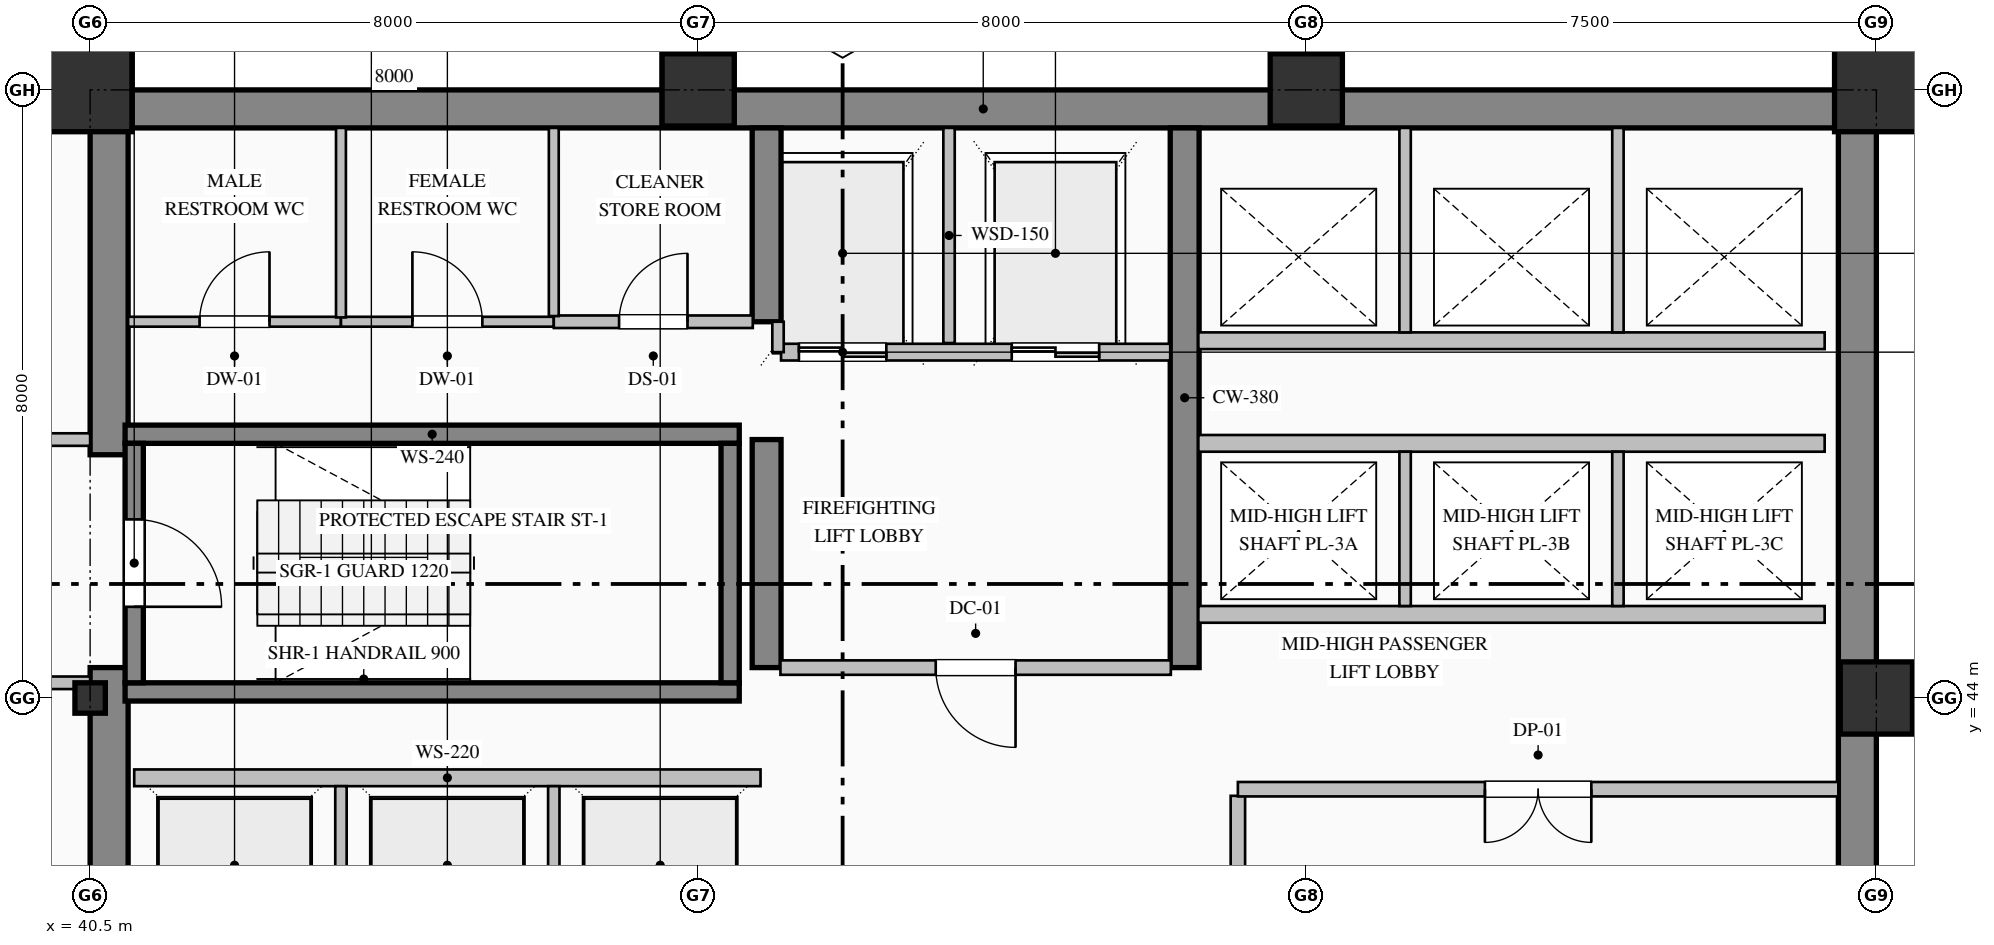
"""IFC4 building model, lengths in metres.
Left out: names, types, materials, properties, quantities, classifications, styles, units other than length and angle.
Written with IfcOpenShell. Run it as: python <this file> out.ifc"""

import sys

from ifc_helpers import new_model, si_unit, direction, frame, frame_2d, origin, origin_2d, place, context, subcontext, project, spatial, rectangle, hollow_rectangle, i_section, extrude, element, fill, save


model = new_model("IFC4")
c1 = context("Model", 3, precision=1e-05, world=origin(), true_north=direction((0.0, 1.0)))
c2 = subcontext(c1, "Body", "Model", "MODEL_VIEW")
j1 = project(units=[si_unit("LENGTHUNIT", "METRE"), si_unit("PLANEANGLEUNIT", "RADIAN")], contexts=[c1])
p1 = place(None, origin())
s1 = spatial("IfcSite", under=j1, at=p1, CompositionType="ELEMENT")
p2 = place(p1, origin())
s2 = spatial("IfcBuilding", under=s1, at=p2, CompositionType="ELEMENT")
p3 = place(p2, frame((0.0, 0.0, 139.0)))
s3 = spatial("IfcBuildingStorey", under=s2, at=p3, CompositionType="ELEMENT", Elevation=139.0)
p4 = place(p3, frame((40.5, 51.75, 0.0), z_axis=(0.0, 0.0, 1.0), x_axis=(1.0, 0.0, 0.0)))
e1 = element("IfcWall", 1, at=p4, inside=s3, PredefinedType="SHEAR", context=c2, shape_type="SweptSolid", body=[
    extrude(rectangle(XDim=23.5, YDim=0.5, at=frame_2d((11.75, 0.0))), origin(), (0.0, 0.0, 1.0), 3.765),
])
p5 = place(p3, frame((63.75, 36.32, 0.0), z_axis=(0.0, 0.0, 1.0), x_axis=(0.0, 1.0, 0.0)))
e2 = element("IfcWall", 2, at=p5, inside=s3, PredefinedType="SHEAR", context=c2, shape_type="SweptSolid", body=[
    extrude(rectangle(XDim=15.18, YDim=0.5, at=frame_2d((7.59, 0.0))), origin(), (0.0, 0.0, 1.0), 3.765),
])
p6 = place(p3, frame((40.75, 36.5, 0.0), z_axis=(0.0, 0.0, 1.0), x_axis=(0.0, 1.0, 0.0)))
e3 = element("IfcWall", 3, at=p6, inside=s3, PredefinedType="SHEAR", context=c2, shape_type="SweptSolid", body=[
    extrude(rectangle(XDim=7.9, YDim=0.5, at=frame_2d((3.95, 0.0))), origin(), (0.0, 0.0, 1.0), 3.765),
])
p7 = place(p3, frame((40.75, 47.2, 0.0), z_axis=(0.0, 0.0, 1.0), x_axis=(0.0, 1.0, 0.0)))
e4 = element("IfcWall", 4, at=p7, inside=s3, PredefinedType="SHEAR", context=c2, shape_type="SweptSolid", body=[
    extrude(rectangle(XDim=4.3, YDim=0.5, at=frame_2d((2.15, 0.0))), origin(), (0.0, 0.0, 1.0), 3.765),
])
p8 = place(p3, frame((49.4, 44.4, 0.0), z_axis=(0.0, 0.0, 1.0), x_axis=(0.0, 1.0, 0.0)))
e5 = element("IfcWall", 5, at=p8, inside=s3, PredefinedType="SHEAR", context=c2, shape_type="SweptSolid", body=[
    extrude(rectangle(XDim=3.0, YDim=0.38, at=frame_2d((1.5, 0.0))), origin(), (0.0, 0.0, 1.0), 3.765),
])
p9 = place(p3, frame((49.4, 48.95, 0.0), z_axis=(0.0, 0.0, 1.0), x_axis=(0.0, 1.0, 0.0)))
e6 = element("IfcWall", 6, at=p9, inside=s3, PredefinedType="SHEAR", context=c2, shape_type="SweptSolid", body=[
    extrude(rectangle(XDim=2.55, YDim=0.38, at=frame_2d((1.275, 0.0))), origin(), (0.0, 0.0, 1.0), 3.765),
])
p10 = place(p3, frame((54.9, 44.4, 0.0), z_axis=(0.0, 0.0, 1.0), x_axis=(0.0, 1.0, 0.0)))
e7 = element("IfcWall", 7, at=p10, inside=s3, PredefinedType="SHEAR", context=c2, shape_type="SweptSolid", body=[
    extrude(rectangle(XDim=7.1, YDim=0.38, at=frame_2d((3.55, 0.0))), origin(), (0.0, 0.0, 1.0), 3.765),
])
p11 = place(p3, frame((40.5, 44.0, 0.0), z_axis=(0.0, 0.0, 1.0), x_axis=(1.0, 0.0, 0.0)))
e8 = element("IfcColumn", 8, at=p11, inside=s3, PredefinedType="COLUMN", context=c2, shape_type="SweptSolid", body=[
    extrude(i_section(OverallWidth=0.4, OverallDepth=0.4, WebThickness=0.013, FlangeThickness=0.021, FilletRadius=0.022, at=origin_2d()), origin(), (0.0, 0.0, 1.0), 4.0),
])
p12 = place(p3, frame((40.5, 52.0, 0.0), z_axis=(0.0, 0.0, 1.0), x_axis=(1.0, 0.0, 0.0)))
e9 = element("IfcColumn", 9, at=p12, inside=s3, PredefinedType="COLUMN", context=c2, shape_type="SweptSolid", body=[
    extrude(hollow_rectangle(XDim=1.1, YDim=1.1, WallThickness=0.04, at=origin_2d()), origin(), (0.0, 0.0, 1.0), 4.0),
])
for number, where, z_axis, x_axis in (
    (10, (48.5, 52.0, 0.0), (0.0, 0.0, 1.0), (1.0, 0.0, 0.0)),
    (11, (56.5, 52.0, 0.0), (0.0, 0.0, 1.0), (1.0, 0.0, 0.0)),
    (12, (64.0, 44.0, 0.0), (0.0, 0.0, 1.0), (1.0, 0.0, 0.0)),
):
    element("IfcColumn", number, at=place(p3, frame(where, z_axis=z_axis, x_axis=x_axis)), inside=s3, PredefinedType="COLUMN", context=c2, shape_type="SweptSolid", body=[
        extrude(hollow_rectangle(XDim=0.95, YDim=0.95, WallThickness=0.036, at=origin_2d()), origin(), (0.0, 0.0, 1.0), 4.0),
    ])
p13 = place(p3, frame((64.0, 52.0, 0.0), z_axis=(0.0, 0.0, 1.0), x_axis=(1.0, 0.0, 0.0)))
e13 = element("IfcColumn", 13, at=p13, inside=s3, PredefinedType="COLUMN", context=c2, shape_type="SweptSolid", body=[
    extrude(hollow_rectangle(XDim=1.1, YDim=1.1, WallThickness=0.04, at=origin_2d()), origin(), (0.0, 0.0, 1.0), 4.0),
])
p14 = place(p3, frame((13.0, 51.83, 0.0), z_axis=(0.0, 0.0, 1.0), x_axis=(1.0, 0.0, 0.0)))
e14 = element("IfcWall", 14, at=p14, inside=s3, PredefinedType="SOLIDWALL", context=c2, shape_type="SweptSolid", body=[
    extrude(rectangle(XDim=27.52, YDim=0.34, at=frame_2d((13.76, 0.0))), origin(), (0.0, 0.0, 1.0), 3.265),
])
p15 = place(p14, frame((6.45, 0.0, 0.85)))
e15 = element("IfcOpeningElement", 15, at=p15, cuts=e14, PredefinedType="OPENING", context=c2, shape_type="SweptSolid", body=[
    extrude(rectangle(XDim=1.5, YDim=1.95, at=frame_2d((0.75, 0.975))), frame((0.0, 0.18, 0.0), z_axis=(0.0, -1.0, 0.0), x_axis=(1.0, 0.0, 0.0)), (0.0, 0.0, 1.0), 0.36),
])
p16 = place(p14, frame((13.8, 0.0, 0.7)))
e16 = element("IfcOpeningElement", 16, at=p16, cuts=e14, PredefinedType="OPENING", context=c2, shape_type="SweptSolid", body=[
    extrude(rectangle(XDim=1.2, YDim=1.85, at=frame_2d((0.6, 0.925))), frame((0.0, 0.18, 0.0), z_axis=(0.0, -1.0, 0.0), x_axis=(1.0, 0.0, 0.0)), (0.0, 0.0, 1.0), 0.36),
])
for number, where, z_axis, x_axis in (
    (17, (40.96, 47.47, 0.0), (0.0, 0.0, 1.0), (1.0, 0.0, 0.0)),
    (18, (49.04, 44.08, 0.0), (0.0, 0.0, 1.0), (-1.0, 0.0, 0.0)),
):
    element("IfcWall", number, at=place(p3, frame(where, z_axis=z_axis, x_axis=x_axis)), inside=s3, PredefinedType="SOLIDWALL", context=c2, shape_type="SweptSolid", body=[
        extrude(rectangle(XDim=8.08, YDim=0.24, at=frame_2d((4.04, 0.0))), origin(), (0.0, 0.0, 1.0), 4.0),
    ])
p17 = place(p3, frame((41.08, 47.35, 0.0), z_axis=(0.0, 0.0, 1.0), x_axis=(0.0, -1.0, 0.0)))
e19 = element("IfcWall", 19, at=p17, inside=s3, PredefinedType="SOLIDWALL", context=c2, shape_type="SweptSolid", body=[
    extrude(rectangle(XDim=3.15, YDim=0.24, at=frame_2d((1.575, 0.0))), origin(), (0.0, 0.0, 1.0), 4.0),
])
p18 = place(p17, frame((1.0, 0.0, 0.0)))
e20 = element("IfcOpeningElement", 20, at=p18, cuts=e19, PredefinedType="OPENING", context=c2, shape_type="SweptSolid", body=[
    extrude(rectangle(XDim=1.15, YDim=2.2, at=frame_2d((0.575, 1.1))), frame((0.0, 0.13, 0.0), z_axis=(0.0, -1.0, 0.0), x_axis=(1.0, 0.0, 0.0)), (0.0, 0.0, 1.0), 0.26),
])
p19 = place(p3, frame((48.92, 44.2, 0.0), z_axis=(0.0, 0.0, 1.0), x_axis=(0.0, 1.0, 0.0)))
e21 = element("IfcWall", 21, at=p19, inside=s3, PredefinedType="SOLIDWALL", context=c2, shape_type="SweptSolid", body=[
    extrude(rectangle(XDim=3.15, YDim=0.24, at=frame_2d((1.575, 0.0))), origin(), (0.0, 0.0, 1.0), 4.0),
])
p20 = place(p3, frame((54.71, 48.55, 0.0), z_axis=(0.0, 0.0, 1.0), x_axis=(-1.0, 0.0, 0.0)))
e22 = element("IfcWall", 22, at=p20, inside=s3, PredefinedType="PARTITIONING", context=c2, shape_type="SweptSolid", body=[
    extrude(rectangle(XDim=5.12, YDim=0.22, at=frame_2d((2.56, 0.0))), origin(), (0.0, 0.0, 1.0), 3.765),
])
p21 = place(p20, frame((3.735, 0.0, 0.0)))
e23 = element("IfcOpeningElement", 23, at=p21, cuts=e22, PredefinedType="OPENING", context=c2, shape_type="SweptSolid", body=[
    extrude(rectangle(XDim=1.15, YDim=2.2, at=frame_2d((0.575, 1.1))), frame((0.0, 0.12, 0.0), z_axis=(0.0, -1.0, 0.0), x_axis=(1.0, 0.0, 0.0)), (0.0, 0.0, 1.0), 0.24),
])
p22 = place(p20, frame((0.935, 0.0, 0.0)))
e24 = element("IfcOpeningElement", 24, at=p22, cuts=e22, PredefinedType="OPENING", context=c2, shape_type="SweptSolid", body=[
    extrude(rectangle(XDim=1.15, YDim=2.2, at=frame_2d((0.575, 1.1))), frame((0.0, 0.12, 0.0), z_axis=(0.0, -1.0, 0.0), x_axis=(1.0, 0.0, 0.0)), (0.0, 0.0, 1.0), 0.24),
])
p23 = place(p3, frame((51.8, 48.67, 0.0), z_axis=(0.0, 0.0, 1.0), x_axis=(0.0, 1.0, 0.0)))
e25 = element("IfcWall", 25, at=p23, inside=s3, PredefinedType="PARTITIONING", context=c2, shape_type="SweptSolid", body=[
    extrude(rectangle(XDim=2.83, YDim=0.15, at=frame_2d((1.415, 0.0))), origin(), (0.0, 0.0, 1.0), 3.765),
])
p24 = place(p3, frame((49.55, 48.55, 0.0), z_axis=(0.0, 0.0, 1.0), x_axis=(0.0, 1.0, 0.0)))
e26 = element("IfcWall", 26, at=p24, inside=s3, PredefinedType="PARTITIONING", context=c2, shape_type="SweptSolid", body=[
    extrude(rectangle(XDim=0.4, YDim=0.15, at=frame_2d((0.2, 0.0))), origin(), (0.0, 0.0, 1.0), 3.765),
])
p25 = place(p3, frame((41.08, 42.95, 0.0), z_axis=(0.0, 0.0, 1.0), x_axis=(1.0, 0.0, 0.0)))
e27 = element("IfcWall", 27, at=p25, inside=s3, PredefinedType="PARTITIONING", context=c2, shape_type="SweptSolid", body=[
    extrude(rectangle(XDim=8.24, YDim=0.22, at=frame_2d((4.12, 0.0))), origin(), (0.0, 0.0, 1.0), 3.765),
])
for number, where, z_axis, x_axis in (
    (28, (43.8, 40.76, 0.0), (0.0, 0.0, 1.0), (0.0, 1.0, 0.0)),
    (29, (46.6, 40.76, 0.0), (0.0, 0.0, 1.0), (0.0, 1.0, 0.0)),
):
    element("IfcWall", number, at=place(p3, frame(where, z_axis=z_axis, x_axis=x_axis)), inside=s3, PredefinedType="PARTITIONING", context=c2, shape_type="SweptSolid", body=[
        extrude(rectangle(XDim=2.08, YDim=0.15, at=frame_2d((1.04, 0.0))), origin(), (0.0, 0.0, 1.0), 3.765),
    ])
for number, where, z_axis, x_axis in (
    (30, (63.32, 45.1, 0.0), (0.0, 0.0, 1.0), (-1.0, 0.0, 0.0)),
    (31, (55.08, 47.35, 0.0), (0.0, 0.0, 1.0), (1.0, 0.0, 0.0)),
):
    element("IfcWall", number, at=place(p3, frame(where, z_axis=z_axis, x_axis=x_axis)), inside=s3, PredefinedType="PARTITIONING", context=c2, shape_type="SweptSolid", body=[
        extrude(rectangle(XDim=8.24, YDim=0.22, at=frame_2d((4.12, 0.0))), origin(), (0.0, 0.0, 1.0), 3.765),
    ])
for number, where, z_axis, x_axis in (
    (32, (57.8, 45.21, 0.0), (0.0, 0.0, 1.0), (0.0, 1.0, 0.0)),
    (33, (60.6, 45.21, 0.0), (0.0, 0.0, 1.0), (0.0, 1.0, 0.0)),
):
    element("IfcWall", number, at=place(p3, frame(where, z_axis=z_axis, x_axis=x_axis)), inside=s3, PredefinedType="PARTITIONING", context=c2, shape_type="SweptSolid", body=[
        extrude(rectangle(XDim=2.03, YDim=0.15, at=frame_2d((1.015, 0.0))), origin(), (0.0, 0.0, 1.0), 3.765),
    ])
p26 = place(p3, frame((63.32, 48.7, 0.0), z_axis=(0.0, 0.0, 1.0), x_axis=(-1.0, 0.0, 0.0)))
e34 = element("IfcWall", 34, at=p26, inside=s3, PredefinedType="PARTITIONING", context=c2, shape_type="SweptSolid", body=[
    extrude(rectangle(XDim=8.24, YDim=0.22, at=frame_2d((4.12, 0.0))), origin(), (0.0, 0.0, 1.0), 3.765),
])
for number, where, z_axis, x_axis in (
    (35, (57.8, 48.81, 0.0), (0.0, 0.0, 1.0), (0.0, 1.0, 0.0)),
    (36, (60.6, 48.81, 0.0), (0.0, 0.0, 1.0), (0.0, 1.0, 0.0)),
):
    element("IfcWall", number, at=place(p3, frame(where, z_axis=z_axis, x_axis=x_axis)), inside=s3, PredefinedType="PARTITIONING", context=c2, shape_type="SweptSolid", body=[
        extrude(rectangle(XDim=2.69, YDim=0.15, at=frame_2d((1.345, 0.0))), origin(), (0.0, 0.0, 1.0), 3.765),
    ])
p27 = place(p3, frame((37.8, 47.4, 0.0), z_axis=(0.0, 0.0, 1.0), x_axis=(1.0, 0.0, 0.0)))
e37 = element("IfcWall", 37, at=p27, inside=s3, PredefinedType="PARTITIONING", context=c2, shape_type="SweptSolid", body=[
    extrude(rectangle(XDim=2.7, YDim=0.165, at=frame_2d((1.35, 0.0))), origin(), (0.0, 0.0, 1.0), 3.765),
])
p28 = place(p27, frame((0.825, 0.0, 0.0)))
e38 = element("IfcOpeningElement", 38, at=p28, cuts=e37, PredefinedType="OPENING", context=c2, shape_type="SweptSolid", body=[
    extrude(rectangle(XDim=1.05, YDim=2.15, at=frame_2d((0.525, 1.075))), frame((0.0, 0.093, 0.0), z_axis=(0.0, -1.0, 0.0), x_axis=(1.0, 0.0, 0.0)), (0.0, 0.0, 1.0), 0.185),
])
p29 = place(p3, frame((40.5, 44.2, 0.0), z_axis=(0.0, 0.0, 1.0), x_axis=(-1.0, 0.0, 0.0)))
e39 = element("IfcWall", 39, at=p29, inside=s3, PredefinedType="PARTITIONING", context=c2, shape_type="SweptSolid", body=[
    extrude(rectangle(XDim=2.7, YDim=0.165, at=frame_2d((1.35, 0.0))), origin(), (0.0, 0.0, 1.0), 3.765),
])
p30 = place(p29, frame((0.825, 0.0, 0.0)))
e40 = element("IfcOpeningElement", 40, at=p30, cuts=e39, PredefinedType="OPENING", context=c2, shape_type="SweptSolid", body=[
    extrude(rectangle(XDim=1.05, YDim=2.15, at=frame_2d((0.525, 1.075))), frame((0.0, 0.093, 0.0), z_axis=(0.0, -1.0, 0.0), x_axis=(1.0, 0.0, 0.0)), (0.0, 0.0, 1.0), 0.185),
])
p31 = place(p3, frame((41.0, 48.95, 0.0), z_axis=(0.0, 0.0, 1.0), x_axis=(1.0, 0.0, 0.0)))
e41 = element("IfcWall", 41, at=p31, inside=s3, PredefinedType="PARTITIONING", context=c2, shape_type="SweptSolid", body=[
    extrude(rectangle(XDim=2.8, YDim=0.13, at=frame_2d((1.4, 0.0))), origin(), (0.0, 0.0, 1.0), 3.765),
])
p32 = place(p31, frame((0.94, 0.0, 0.0)))
e42 = element("IfcOpeningElement", 42, at=p32, cuts=e41, PredefinedType="OPENING", context=c2, shape_type="SweptSolid", body=[
    extrude(rectangle(XDim=0.92, YDim=2.15, at=frame_2d((0.46, 1.075))), frame((0.0, 0.075, 0.0), z_axis=(0.0, -1.0, 0.0), x_axis=(1.0, 0.0, 0.0)), (0.0, 0.0, 1.0), 0.15),
])
p33 = place(p3, frame((43.8, 48.95, 0.0), z_axis=(0.0, 0.0, 1.0), x_axis=(1.0, 0.0, 0.0)))
e43 = element("IfcWall", 43, at=p33, inside=s3, PredefinedType="PARTITIONING", context=c2, shape_type="SweptSolid", body=[
    extrude(rectangle(XDim=2.8, YDim=0.13, at=frame_2d((1.4, 0.0))), origin(), (0.0, 0.0, 1.0), 3.765),
])
p34 = place(p33, frame((0.94, 0.0, 0.0)))
e44 = element("IfcOpeningElement", 44, at=p34, cuts=e43, PredefinedType="OPENING", context=c2, shape_type="SweptSolid", body=[
    extrude(rectangle(XDim=0.92, YDim=2.15, at=frame_2d((0.46, 1.075))), frame((0.0, 0.075, 0.0), z_axis=(0.0, -1.0, 0.0), x_axis=(1.0, 0.0, 0.0)), (0.0, 0.0, 1.0), 0.15),
])
p35 = place(p3, frame((46.6, 48.95, 0.0), z_axis=(0.0, 0.0, 1.0), x_axis=(1.0, 0.0, 0.0)))
e45 = element("IfcWall", 45, at=p35, inside=s3, PredefinedType="PARTITIONING", context=c2, shape_type="SweptSolid", body=[
    extrude(rectangle(XDim=2.618, YDim=0.165, at=frame_2d((1.309, 0.0))), origin(), (0.0, 0.0, 1.0), 3.765),
])
p36 = place(p35, frame((0.859, 0.0, 0.0)))
e46 = element("IfcOpeningElement", 46, at=p36, cuts=e45, PredefinedType="OPENING", context=c2, shape_type="SweptSolid", body=[
    extrude(rectangle(XDim=0.9, YDim=2.15, at=frame_2d((0.45, 1.075))), frame((0.0, 0.093, 0.0), z_axis=(0.0, -1.0, 0.0), x_axis=(1.0, 0.0, 0.0)), (0.0, 0.0, 1.0), 0.185),
])
p37 = place(p3, frame((54.718, 44.4, 0.0), z_axis=(0.0, 0.0, 1.0), x_axis=(-1.0, 0.0, 0.0)))
e47 = element("IfcWall", 47, at=p37, inside=s3, PredefinedType="PARTITIONING", context=c2, shape_type="SweptSolid", body=[
    extrude(rectangle(XDim=5.136, YDim=0.19, at=frame_2d((2.568, 0.0))), origin(), (0.0, 0.0, 1.0), 3.765),
])
p38 = place(p37, frame((2.043, 0.0, 0.0)))
e48 = element("IfcOpeningElement", 48, at=p38, cuts=e47, PredefinedType="OPENING", context=c2, shape_type="SweptSolid", body=[
    extrude(rectangle(XDim=1.05, YDim=2.15, at=frame_2d((0.525, 1.075))), frame((0.0, 0.105, 0.0), z_axis=(0.0, -1.0, 0.0), x_axis=(1.0, 0.0, 0.0)), (0.0, 0.0, 1.0), 0.21),
])
p39 = place(p3, frame((55.6, 42.713, 0.0), z_axis=(0.0, 0.0, 1.0), x_axis=(0.0, -1.0, 0.0)))
e49 = element("IfcWall", 49, at=p39, inside=s3, PredefinedType="PARTITIONING", context=c2, shape_type="SweptSolid", body=[
    extrude(rectangle(XDim=2.731, YDim=0.19, at=frame_2d((1.365, 0.0))), origin(), (0.0, 0.0, 1.0), 3.765),
])
p40 = place(p3, frame((63.5, 42.8, 0.0), z_axis=(0.0, 0.0, 1.0), x_axis=(-1.0, 0.0, 0.0)))
e50 = element("IfcWall", 50, at=p40, inside=s3, PredefinedType="PARTITIONING", context=c2, shape_type="SweptSolid", body=[
    extrude(rectangle(XDim=7.9, YDim=0.19, at=frame_2d((3.95, 0.0))), origin(), (0.0, 0.0, 1.0), 3.765),
])
p41 = place(p40, frame((3.25, 0.0, 0.0)))
e51 = element("IfcOpeningElement", 51, at=p41, cuts=e50, PredefinedType="OPENING", context=c2, shape_type="SweptSolid", body=[
    extrude(rectangle(XDim=1.4, YDim=2.25, at=frame_2d((0.7, 1.125))), frame((0.0, 0.105, 0.0), z_axis=(0.0, -1.0, 0.0), x_axis=(1.0, 0.0, 0.0)), (0.0, 0.0, 1.0), 0.21),
])
p42 = place(p3, frame((43.8, 51.5, 0.0), z_axis=(0.0, 0.0, 1.0), x_axis=(0.0, -1.0, 0.0)))
e52 = element("IfcWall", 52, at=p42, inside=s3, PredefinedType="PARTITIONING", context=c2, shape_type="SweptSolid", body=[
    extrude(rectangle(XDim=2.493, YDim=0.13, at=frame_2d((1.247, 0.0))), origin(), (0.0, 0.0, 1.0), 3.765),
])
p43 = place(p3, frame((46.6, 51.5, 0.0), z_axis=(0.0, 0.0, 1.0), x_axis=(0.0, -1.0, 0.0)))
e53 = element("IfcWall", 53, at=p43, inside=s3, PredefinedType="PARTITIONING", context=c2, shape_type="SweptSolid", body=[
    extrude(rectangle(XDim=2.476, YDim=0.13, at=frame_2d((1.238, 0.0))), origin(), (0.0, 0.0, 1.0), 3.765),
])
p44 = place(p18, origin())
e54 = element("IfcDoor", 54, at=p44, inside=s3, OperationType="SINGLE_SWING_RIGHT", PredefinedType="DOOR", context=c2, shape_type="SweptSolid", body=[
    extrude(rectangle(XDim=1.15, YDim=2.2, at=frame_2d((0.575, 1.1))), frame((0.0, 0.025, 0.0), z_axis=(0.0, -1.0, 0.0), x_axis=(1.0, 0.0, 0.0)), (0.0, 0.0, 1.0), 0.05),
])
fill(e20, e54)
p45 = place(p21, origin())
e55 = element("IfcDoor", 55, at=p45, inside=s3, OperationType="DOUBLE_DOOR_SLIDING", PredefinedType="DOOR", context=c2, shape_type="SweptSolid", body=[
    extrude(rectangle(XDim=1.15, YDim=2.2, at=frame_2d((0.575, 1.1))), frame((0.0, 0.025, 0.0), z_axis=(0.0, -1.0, 0.0), x_axis=(1.0, 0.0, 0.0)), (0.0, 0.0, 1.0), 0.05),
])
fill(e23, e55)
p46 = place(p22, origin())
e56 = element("IfcDoor", 56, at=p46, inside=s3, OperationType="DOUBLE_DOOR_SLIDING", PredefinedType="DOOR", context=c2, shape_type="SweptSolid", body=[
    extrude(rectangle(XDim=1.15, YDim=2.2, at=frame_2d((0.575, 1.1))), frame((0.0, 0.025, 0.0), z_axis=(0.0, -1.0, 0.0), x_axis=(1.0, 0.0, 0.0)), (0.0, 0.0, 1.0), 0.05),
])
fill(e24, e56)
p47 = place(p38, origin())
e57 = element("IfcDoor", 57, at=p47, inside=s3, OperationType="SINGLE_SWING_LEFT", PredefinedType="DOOR", context=c2, shape_type="SweptSolid", body=[
    extrude(rectangle(XDim=1.05, YDim=2.15, at=frame_2d((0.525, 1.075))), frame((0.0, 0.025, 0.0), z_axis=(0.0, -1.0, 0.0), x_axis=(1.0, 0.0, 0.0)), (0.0, 0.0, 1.0), 0.05),
])
fill(e48, e57)
p48 = place(p32, origin())
e58 = element("IfcDoor", 58, at=p48, inside=s3, OperationType="SINGLE_SWING_RIGHT", PredefinedType="DOOR", context=c2, shape_type="SweptSolid", body=[
    extrude(rectangle(XDim=0.92, YDim=2.15, at=frame_2d((0.46, 1.075))), frame((0.0, 0.025, 0.0), z_axis=(0.0, -1.0, 0.0), x_axis=(1.0, 0.0, 0.0)), (0.0, 0.0, 1.0), 0.05),
])
fill(e42, e58)
p49 = place(p34, origin())
e59 = element("IfcDoor", 59, at=p49, inside=s3, OperationType="SINGLE_SWING_LEFT", PredefinedType="DOOR", context=c2, shape_type="SweptSolid", body=[
    extrude(rectangle(XDim=0.92, YDim=2.15, at=frame_2d((0.46, 1.075))), frame((0.0, 0.025, 0.0), z_axis=(0.0, -1.0, 0.0), x_axis=(1.0, 0.0, 0.0)), (0.0, 0.0, 1.0), 0.05),
])
fill(e44, e59)
p50 = place(p36, origin())
e60 = element("IfcDoor", 60, at=p50, inside=s3, OperationType="SINGLE_SWING_RIGHT", PredefinedType="DOOR", context=c2, shape_type="SweptSolid", body=[
    extrude(rectangle(XDim=0.9, YDim=2.15, at=frame_2d((0.45, 1.075))), frame((0.0, 0.025, 0.0), z_axis=(0.0, -1.0, 0.0), x_axis=(1.0, 0.0, 0.0)), (0.0, 0.0, 1.0), 0.05),
])
fill(e46, e60)
p51 = place(p41, origin())
e61 = element("IfcDoor", 61, at=p51, inside=s3, OperationType="DOUBLE_DOOR_SINGLE_SWING", PredefinedType="DOOR", context=c2, shape_type="SweptSolid", body=[
    extrude(rectangle(XDim=1.4, YDim=2.25, at=frame_2d((0.7, 1.125))), frame((0.0, 0.025, 0.0), z_axis=(0.0, -1.0, 0.0), x_axis=(1.0, 0.0, 0.0)), (0.0, 0.0, 1.0), 0.05),
])
fill(e51, e61)
save(model, sys.argv[1])
